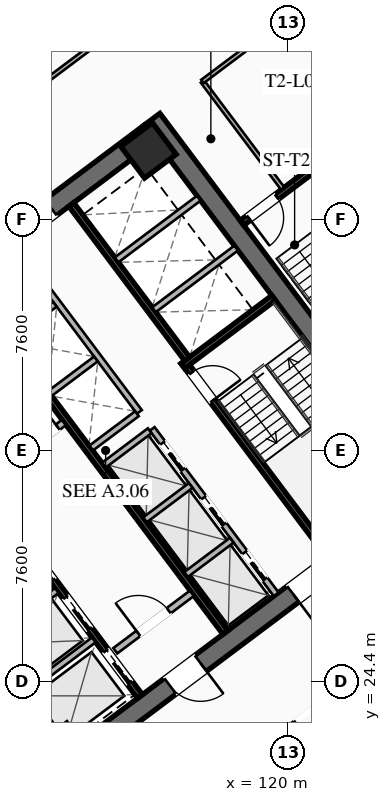
"""IFC4 building model, lengths in metres.
Left out: names, types, materials, properties, quantities, classifications, styles, units other than length and angle.
Written with IfcOpenShell. Run it as: python <this file> out.ifc"""

import sys

from ifc_helpers import new_model, si_unit, direction, frame, frame_2d, origin, origin_2d, place, context, subcontext, project, spatial, rectangle, hollow_rectangle, extrude, element, fill, save


model = new_model("IFC4")
c1 = context("Model", 3, precision=1e-05, world=origin(), true_north=direction((0.0, 1.0)))
c2 = subcontext(c1, "Body", "Model", "MODEL_VIEW")
j1 = project(units=[si_unit("LENGTHUNIT", "METRE"), si_unit("PLANEANGLEUNIT", "RADIAN")], contexts=[c1])
p1 = place(None, origin())
s1 = spatial("IfcSite", under=j1, at=p1, CompositionType="ELEMENT")
p2 = place(p1, origin())
s2 = spatial("IfcBuilding", under=s1, at=p2, CompositionType="ELEMENT")
p3 = place(p2, frame((0.0, 0.0, 31.7)))
s3 = spatial("IfcBuildingStorey", under=s2, at=p3, CompositionType="ELEMENT", Elevation=31.7)
for number, where, z_axis, x_axis in (
    (1, (112.476, 21.107, 0.0), (0.0, 0.0, 1.0), (-0.6, 0.8, 0.0)),
    (2, (115.524, 42.893, 0.0), (0.0, 0.0, 1.0), (0.6, -0.8, 0.0)),
):
    element("IfcWall", number, at=place(p3, frame(where, z_axis=z_axis, x_axis=x_axis)), inside=s3, PredefinedType="SHEAR", context=c2, shape_type="SweptSolid", body=[
        extrude(rectangle(XDim=15.6, YDim=0.65, at=frame_2d((7.8, 0.0))), origin(), (0.0, 0.0, 1.0), 3.55),
    ])
p4 = place(p3, frame((124.429, 30.478, 0.0), z_axis=(0.0, 0.0, 1.0), x_axis=(-0.799998028465, -0.600002628705, 0.0)))
e3 = element("IfcWall", 3, at=p4, inside=s3, PredefinedType="SHEAR", context=c2, shape_type="SweptSolid", body=[
    extrude(rectangle(XDim=14.86, YDim=0.65, at=frame_2d((7.43, 0.0))), origin(), (0.0, 0.0, 1.0), 3.55),
])
p5 = place(p4, frame((9.13, 0.0, 0.0)))
e4 = element("IfcOpeningElement", 4, at=p5, cuts=e3, PredefinedType="OPENING", context=c2, shape_type="SweptSolid", body=[
    extrude(rectangle(XDim=1.25, YDim=2.25, at=frame_2d((0.625, 1.125))), frame((0.0, 0.335, 0.0), z_axis=(0.0, -1.0, 0.0), x_axis=(1.0, 0.0, 0.0)), (0.0, 0.0, 1.0), 0.67),
])
p6 = place(p4, frame((4.08, 0.0, 0.0)))
e5 = element("IfcOpeningElement", 5, at=p6, cuts=e3, PredefinedType="OPENING", context=c2, shape_type="SweptSolid", body=[
    extrude(rectangle(XDim=1.25, YDim=2.25, at=frame_2d((0.625, 1.125))), frame((0.0, 0.335, 0.0), z_axis=(0.0, -1.0, 0.0), x_axis=(1.0, 0.0, 0.0)), (0.0, 0.0, 1.0), 0.67),
])
p7 = place(p3, frame((103.571, 33.522, 0.0), z_axis=(0.0, 0.0, 1.0), x_axis=(0.799998028465, 0.600002628705, 0.0)))
e6 = element("IfcWall", 6, at=p7, inside=s3, PredefinedType="SHEAR", context=c2, shape_type="SweptSolid", body=[
    extrude(rectangle(XDim=14.86, YDim=0.65, at=frame_2d((7.43, 0.0))), origin(), (0.0, 0.0, 1.0), 3.55),
])
p8 = place(p7, frame((4.48, 0.0, 0.0)))
e7 = element("IfcOpeningElement", 7, at=p8, cuts=e6, PredefinedType="OPENING", context=c2, shape_type="SweptSolid", body=[
    extrude(rectangle(XDim=1.25, YDim=2.25, at=frame_2d((0.625, 1.125))), frame((0.0, 0.335, 0.0), z_axis=(0.0, -1.0, 0.0), x_axis=(1.0, 0.0, 0.0)), (0.0, 0.0, 1.0), 0.67),
])
p9 = place(p7, frame((9.53, 0.0, 0.0)))
e8 = element("IfcOpeningElement", 8, at=p9, cuts=e6, PredefinedType="OPENING", context=c2, shape_type="SweptSolid", body=[
    extrude(rectangle(XDim=1.25, YDim=2.25, at=frame_2d((0.625, 1.125))), frame((0.0, 0.335, 0.0), z_axis=(0.0, -1.0, 0.0), x_axis=(1.0, 0.0, 0.0)), (0.0, 0.0, 1.0), 0.67),
])
p10 = place(p3, frame((115.41, 41.87, 0.0), z_axis=(0.0, 0.0, 1.0), x_axis=(0.799999996291, 0.600000004945, 0.0)))
e9 = element("IfcColumn", 9, at=p10, inside=s3, PredefinedType="COLUMN", context=c2, shape_type="SweptSolid", body=[
    extrude(hollow_rectangle(XDim=1.3, YDim=1.3, WallThickness=0.05, at=origin_2d()), origin(), (0.0, 0.0, 1.0), 3.35),
])
p11 = place(p3, frame((116.56, 34.92, 0.0), z_axis=(0.0, 0.0, 1.0), x_axis=(0.600009827119, -0.799992629566, 0.0)))
e10 = element("IfcWall", 10, at=p11, inside=s3, PredefinedType="SHEAR", context=c2, shape_type="SweptSolid", body=[
    extrude(rectangle(XDim=7.95, YDim=0.2, at=frame_2d((3.975, 0.0))), origin(), (0.0, 0.0, 1.0), 3.35),
])
p12 = place(p11, frame((0.45, 0.0, 0.0)))
e11 = element("IfcOpeningElement", 11, at=p12, cuts=e10, PredefinedType="OPENING", context=c2, shape_type="SweptSolid", body=[
    extrude(rectangle(XDim=1.15, YDim=2.2, at=frame_2d((0.575, 1.1))), frame((0.0, 0.11, 0.0), z_axis=(0.0, -1.0, 0.0), x_axis=(1.0, 0.0, 0.0)), (0.0, 0.0, 1.0), 0.22),
])
p13 = place(p3, frame((116.54, 34.78, 0.0), z_axis=(0.0, 0.0, 1.0), x_axis=(0.799984290658, 0.600020945218, 0.0)))
e12 = element("IfcWall", 12, at=p13, inside=s3, PredefinedType="SHEAR", context=c2, shape_type="SweptSolid", body=[
    extrude(rectangle(XDim=3.73, YDim=0.2, at=frame_2d((1.865, 0.0))), origin(), (0.0, 0.0, 1.0), 3.35),
])
p14 = place(p3, frame((117.938, 26.016, 0.0), z_axis=(0.0, 0.0, 1.0), x_axis=(-0.600005463273, 0.799995902516, 0.0)))
e13 = element("IfcWall", 13, at=p14, inside=s3, PredefinedType="SHEAR", context=c2, shape_type="SweptSolid", body=[
    extrude(rectangle(XDim=14.3, YDim=0.2, at=frame_2d((7.15, 0.0))), origin(), (0.0, 0.0, 1.0), 3.35),
])
p15 = place(p3, frame((110.104, 31.028, 0.0), z_axis=(0.0, 0.0, 1.0), x_axis=(0.800018601094, 0.59997519774, 0.0)))
e14 = element("IfcWall", 14, at=p15, inside=s3, PredefinedType="SOLIDWALL", context=c2, shape_type="SweptSolid", body=[
    extrude(rectangle(XDim=3.15, YDim=0.22, at=frame_2d((1.575, 0.0))), origin(), (0.0, 0.0, 1.0), 2.703),
])
p16 = place(p15, frame((0.25, 0.0, 0.0)))
e15 = element("IfcOpeningElement", 15, at=p16, cuts=e14, PredefinedType="OPENING", context=c2, shape_type="SweptSolid", body=[
    extrude(rectangle(XDim=0.95, YDim=2.05, at=frame_2d((0.475, 1.025))), frame((0.0, 0.12, 0.0), z_axis=(0.0, -1.0, 0.0), x_axis=(1.0, 0.0, 0.0)), (0.0, 0.0, 1.0), 0.24),
])
p17 = place(p15, frame((1.95, 0.0, 0.0)))
e16 = element("IfcOpeningElement", 16, at=p17, cuts=e14, PredefinedType="OPENING", context=c2, shape_type="SweptSolid", body=[
    extrude(rectangle(XDim=0.95, YDim=2.05, at=frame_2d((0.475, 1.025))), frame((0.0, 0.12, 0.0), z_axis=(0.0, -1.0, 0.0), x_axis=(1.0, 0.0, 0.0)), (0.0, 0.0, 1.0), 0.24),
])
p18 = place(p3, frame((114.316, 25.412, 0.0), z_axis=(0.0, 0.0, 1.0), x_axis=(0.800018601094, 0.59997519774, 0.0)))
e17 = element("IfcWall", 17, at=p18, inside=s3, PredefinedType="SOLIDWALL", context=c2, shape_type="SweptSolid", body=[
    extrude(rectangle(XDim=3.15, YDim=0.22, at=frame_2d((1.575, 0.0))), origin(), (0.0, 0.0, 1.0), 2.703),
])
p19 = place(p18, frame((0.95, 0.0, 0.0)))
e18 = element("IfcOpeningElement", 18, at=p19, cuts=e17, PredefinedType="OPENING", context=c2, shape_type="SweptSolid", body=[
    extrude(rectangle(XDim=1.25, YDim=2.25, at=frame_2d((0.625, 1.125))), frame((0.0, 0.12, 0.0), z_axis=(0.0, -1.0, 0.0), x_axis=(1.0, 0.0, 0.0)), (0.0, 0.0, 1.0), 0.24),
])
p20 = place(p3, frame((115.13, 23.91, 0.0), z_axis=(0.0, 0.0, 1.0), x_axis=(-0.599975393228, 0.800018454488, 0.0)))
e19 = element("IfcWall", 19, at=p20, inside=s3, PredefinedType="SHEAR", context=c2, shape_type="SweptSolid", body=[
    extrude(rectangle(XDim=6.35, YDim=0.2, at=frame_2d((3.175, 0.0))), origin(), (0.0, 0.0, 1.0), 3.35),
])
p21 = place(p20, frame((4.775, 0.0, 0.0)))
e20 = element("IfcOpeningElement", 20, at=p21, cuts=e19, PredefinedType="OPENING", context=c2, shape_type="SweptSolid", body=[
    extrude(rectangle(XDim=1.3, YDim=2.25, at=frame_2d((0.65, 1.125))), frame((0.0, 0.11, 0.0), z_axis=(0.0, -1.0, 0.0), x_axis=(1.0, 0.0, 0.0)), (0.0, 0.0, 1.0), 0.22),
])
p22 = place(p20, frame((2.775, 0.0, 0.0)))
e21 = element("IfcOpeningElement", 21, at=p22, cuts=e19, PredefinedType="OPENING", context=c2, shape_type="SweptSolid", body=[
    extrude(rectangle(XDim=1.3, YDim=2.25, at=frame_2d((0.65, 1.125))), frame((0.0, 0.11, 0.0), z_axis=(0.0, -1.0, 0.0), x_axis=(1.0, 0.0, 0.0)), (0.0, 0.0, 1.0), 0.22),
])
p23 = place(p20, frame((0.575, 0.0, 0.0)))
e22 = element("IfcOpeningElement", 22, at=p23, cuts=e19, PredefinedType="OPENING", context=c2, shape_type="SweptSolid", body=[
    extrude(rectangle(XDim=1.3, YDim=2.25, at=frame_2d((0.65, 1.125))), frame((0.0, 0.11, 0.0), z_axis=(0.0, -1.0, 0.0), x_axis=(1.0, 0.0, 0.0)), (0.0, 0.0, 1.0), 0.22),
])
for number, where, z_axis, x_axis in (
    (23, (110.906, 23.742, 0.0), (0.0, 0.0, 1.0), (0.8, 0.6, 0.0)),
    (24, (109.688, 25.366, 0.0), (0.0, 0.0, 1.0), (0.8, 0.6, 0.0)),
):
    element("IfcWall", number, at=place(p3, frame(where, z_axis=z_axis, x_axis=x_axis)), inside=s3, PredefinedType="SOLIDWALL", context=c2, shape_type="SweptSolid", body=[
        extrude(rectangle(XDim=3.38, YDim=0.2, at=frame_2d((1.69, 0.0))), origin(), (0.0, 0.0, 1.0), 3.35),
    ])
p24 = place(p3, frame((112.87, 40.09, 0.0), z_axis=(0.0, 0.0, 1.0), x_axis=(0.599975393228, -0.800018454488, 0.0)))
e25 = element("IfcWall", 25, at=p24, inside=s3, PredefinedType="SHEAR", context=c2, shape_type="SweptSolid", body=[
    extrude(rectangle(XDim=6.35, YDim=0.2, at=frame_2d((3.175, 0.0))), origin(), (0.0, 0.0, 1.0), 3.35),
])
for number, where, z_axis, x_axis in (
    (26, (115.59, 36.63, 0.0), (0.0, 0.0, 1.0), (0.8, 0.6, 0.0)),
    (27, (114.36, 38.27, 0.0), (0.0, 0.0, 1.0), (0.8, 0.6, 0.0)),
):
    element("IfcWall", number, at=place(p3, frame(where, z_axis=z_axis, x_axis=x_axis)), inside=s3, PredefinedType="SOLIDWALL", context=c2, shape_type="SweptSolid", body=[
        extrude(rectangle(XDim=3.38, YDim=0.2, at=frame_2d((1.69, 0.0))), origin(), (0.0, 0.0, 1.0), 3.35),
    ])
p25 = place(p3, frame((119.61, 27.27, 0.0), z_axis=(0.0, 0.0, 1.0), x_axis=(-0.600011488909, 0.79999138319, 0.0)))
e28 = element("IfcWall", 28, at=p25, inside=s3, PredefinedType="SOLIDWALL", context=c2, shape_type="SweptSolid", body=[
    extrude(rectangle(XDim=6.8, YDim=0.2, at=frame_2d((3.4, 0.0))), origin(), (0.0, 0.0, 1.0), 3.35),
])
p26 = place(p25, frame((0.625, 0.0, 0.0)))
e29 = element("IfcOpeningElement", 29, at=p26, cuts=e28, PredefinedType="OPENING", context=c2, shape_type="SweptSolid", body=[
    extrude(rectangle(XDim=1.1, YDim=2.2, at=frame_2d((0.55, 1.1))), frame((0.0, 0.11, 0.0), z_axis=(0.0, -1.0, 0.0), x_axis=(1.0, 0.0, 0.0)), (0.0, 0.0, 1.0), 0.22),
])
p27 = place(p25, frame((2.875, 0.0, 0.0)))
e30 = element("IfcOpeningElement", 30, at=p27, cuts=e28, PredefinedType="OPENING", context=c2, shape_type="SweptSolid", body=[
    extrude(rectangle(XDim=1.1, YDim=2.2, at=frame_2d((0.55, 1.1))), frame((0.0, 0.11, 0.0), z_axis=(0.0, -1.0, 0.0), x_axis=(1.0, 0.0, 0.0)), (0.0, 0.0, 1.0), 0.22),
])
p28 = place(p25, frame((5.125, 0.0, 0.0)))
e31 = element("IfcOpeningElement", 31, at=p28, cuts=e28, PredefinedType="OPENING", context=c2, shape_type="SweptSolid", body=[
    extrude(rectangle(XDim=1.1, YDim=2.2, at=frame_2d((0.55, 1.1))), frame((0.0, 0.11, 0.0), z_axis=(0.0, -1.0, 0.0), x_axis=(1.0, 0.0, 0.0)), (0.0, 0.0, 1.0), 0.22),
])
p29 = place(p3, frame((116.646, 27.922, 0.0), z_axis=(0.0, 0.0, 1.0), x_axis=(0.8, 0.6, 0.0)))
e32 = element("IfcWall", 32, at=p29, inside=s3, PredefinedType="SOLIDWALL", context=c2, shape_type="SweptSolid", body=[
    extrude(rectangle(XDim=1.88, YDim=0.2, at=frame_2d((0.94, 0.0))), origin(), (0.0, 0.0, 1.0), 3.35),
])
p30 = place(p3, frame((115.296, 29.722, 0.0), z_axis=(0.0, 0.0, 1.0), x_axis=(0.799984418148, 0.600020775241, 0.0)))
e33 = element("IfcWall", 33, at=p30, inside=s3, PredefinedType="SOLIDWALL", context=c2, shape_type="SweptSolid", body=[
    extrude(rectangle(XDim=1.88, YDim=0.2, at=frame_2d((0.94, 0.0))), origin(), (0.0, 0.0, 1.0), 3.35),
])
p31 = place(p3, frame((113.946, 31.522, 0.0), z_axis=(0.0, 0.0, 1.0), x_axis=(0.8, 0.6, 0.0)))
e34 = element("IfcWall", 34, at=p31, inside=s3, PredefinedType="SOLIDWALL", context=c2, shape_type="SweptSolid", body=[
    extrude(rectangle(XDim=1.88, YDim=0.2, at=frame_2d((0.94, 0.0))), origin(), (0.0, 0.0, 1.0), 3.35),
])
p32 = place(p3, frame((115.11, 33.27, 0.0), z_axis=(0.0, 0.0, 1.0), x_axis=(-0.600011488909, 0.79999138319, 0.0)))
e35 = element("IfcWall", 35, at=p32, inside=s3, PredefinedType="SOLIDWALL", context=c2, shape_type="SweptSolid", body=[
    extrude(rectangle(XDim=6.8, YDim=0.2, at=frame_2d((3.4, 0.0))), origin(), (0.0, 0.0, 1.0), 3.35),
])
p33 = place(p3, frame((113.526, 32.082, 0.0), z_axis=(0.0, 0.0, 1.0), x_axis=(0.800046745961, 0.599937666993, 0.0)))
e36 = element("IfcWall", 36, at=p33, inside=s3, PredefinedType="SOLIDWALL", context=c2, shape_type="SweptSolid", body=[
    extrude(rectangle(XDim=1.88, YDim=0.2, at=frame_2d((0.94, 0.0))), origin(), (0.0, 0.0, 1.0), 3.35),
])
p34 = place(p3, frame((112.176, 33.882, 0.0), z_axis=(0.0, 0.0, 1.0), x_axis=(0.8, 0.6, 0.0)))
e37 = element("IfcWall", 37, at=p34, inside=s3, PredefinedType="SOLIDWALL", context=c2, shape_type="SweptSolid", body=[
    extrude(rectangle(XDim=1.88, YDim=0.2, at=frame_2d((0.94, 0.0))), origin(), (0.0, 0.0, 1.0), 3.35),
])
p35 = place(p3, frame((110.826, 35.682, 0.0), z_axis=(0.0, 0.0, 1.0), x_axis=(0.799984418148, 0.600020775241, 0.0)))
e38 = element("IfcWall", 38, at=p35, inside=s3, PredefinedType="SOLIDWALL", context=c2, shape_type="SweptSolid", body=[
    extrude(rectangle(XDim=1.88, YDim=0.2, at=frame_2d((0.94, 0.0))), origin(), (0.0, 0.0, 1.0), 3.35),
])
p36 = place(p3, frame((121.204, 41.528, 0.0), z_axis=(0.0, 0.0, 1.0), x_axis=(-0.800017232136, -0.599977023131, 0.0)))
e39 = element("IfcWall", 39, at=p36, inside=s3, PredefinedType="SHEAR", context=c2, shape_type="SweptSolid", body=[
    extrude(rectangle(XDim=3.4, YDim=0.2, at=frame_2d((1.7, 0.0))), origin(), (0.0, 0.0, 1.0), 3.35),
])
p37 = place(p36, frame((1.975, 0.0, 0.0)))
e40 = element("IfcOpeningElement", 40, at=p37, cuts=e39, PredefinedType="OPENING", context=c2, shape_type="SweptSolid", body=[
    extrude(rectangle(XDim=1.15, YDim=2.2, at=frame_2d((0.575, 1.1))), frame((0.0, 0.11, 0.0), z_axis=(0.0, -1.0, 0.0), x_axis=(1.0, 0.0, 0.0)), (0.0, 0.0, 1.0), 0.22),
])
p38 = place(p3, frame((119.824, 40.618, 0.0), z_axis=(0.0, 0.0, 1.0), x_axis=(-0.599982243973, 0.800013316712, 0.0)))
e41 = element("IfcWall", 41, at=p38, inside=s3, PredefinedType="PARTITIONING", context=c2, shape_type="SweptSolid", body=[
    extrude(rectangle(XDim=4.4, YDim=0.135, at=frame_2d((2.2, 0.0))), origin(), (0.0, 0.0, 1.0), 2.703),
])
p39 = place(p3, frame((98.516, 34.012, 0.0), z_axis=(0.0, 0.0, 1.0), x_axis=(0.799998035726, 0.600002619023, 0.0)))
e42 = element("IfcWall", 42, at=p39, inside=s3, PredefinedType="PARTITIONING", context=c2, shape_type="SweptSolid", body=[
    extrude(rectangle(XDim=29.83, YDim=0.135, at=frame_2d((14.915, 0.0))), origin(), (0.0, 0.0, 1.0), 2.703),
])
p40 = place(p39, frame((0.3, 0.0, 0.0)))
e43 = element("IfcOpeningElement", 43, at=p40, cuts=e42, PredefinedType="OPENING", context=c2, shape_type="SweptSolid", body=[
    extrude(rectangle(XDim=0.95, YDim=2.05, at=frame_2d((0.475, 1.025))), frame((0.0, 0.077, 0.0), z_axis=(0.0, -1.0, 0.0), x_axis=(1.0, 0.0, 0.0)), (0.0, 0.0, 1.0), 0.155),
])
p41 = place(p39, frame((10.829, 0.0, 0.0)))
e44 = element("IfcOpeningElement", 44, at=p41, cuts=e42, PredefinedType="OPENING", context=c2, shape_type="SweptSolid", body=[
    extrude(rectangle(XDim=0.95, YDim=2.05, at=frame_2d((0.475, 1.025))), frame((0.0, 0.077, 0.0), z_axis=(0.0, -1.0, 0.0), x_axis=(1.0, 0.0, 0.0)), (0.0, 0.0, 1.0), 0.155),
])
p42 = place(p39, frame((28.58, 0.0, 0.0)))
e45 = element("IfcOpeningElement", 45, at=p42, cuts=e42, PredefinedType="OPENING", context=c2, shape_type="SweptSolid", body=[
    extrude(rectangle(XDim=0.95, YDim=2.05, at=frame_2d((0.475, 1.025))), frame((0.0, 0.077, 0.0), z_axis=(0.0, -1.0, 0.0), x_axis=(1.0, 0.0, 0.0)), (0.0, 0.0, 1.0), 0.155),
])
p43 = place(p3, frame((135.46, 34.47, 0.0), z_axis=(0.0, 0.0, 1.0), x_axis=(-0.800000982127, -0.599998690494, 0.0)))
e46 = element("IfcWall", 46, at=p43, inside=s3, PredefinedType="PARTITIONING", context=c2, shape_type="SweptSolid", body=[
    extrude(rectangle(XDim=29.83, YDim=0.135, at=frame_2d((14.915, 0.0))), origin(), (0.0, 0.0, 1.0), 2.703),
])
p44 = place(p43, frame((28.5, 0.0, 0.0)))
e47 = element("IfcOpeningElement", 47, at=p44, cuts=e46, PredefinedType="OPENING", context=c2, shape_type="SweptSolid", body=[
    extrude(rectangle(XDim=0.95, YDim=2.05, at=frame_2d((0.475, 1.025))), frame((0.0, 0.077, 0.0), z_axis=(0.0, -1.0, 0.0), x_axis=(1.0, 0.0, 0.0)), (0.0, 0.0, 1.0), 0.155),
])
p45 = place(p43, frame((18.075, 0.0, 0.0)))
e48 = element("IfcOpeningElement", 48, at=p45, cuts=e46, PredefinedType="OPENING", context=c2, shape_type="SweptSolid", body=[
    extrude(rectangle(XDim=0.95, YDim=2.05, at=frame_2d((0.475, 1.025))), frame((0.0, 0.077, 0.0), z_axis=(0.0, -1.0, 0.0), x_axis=(1.0, 0.0, 0.0)), (0.0, 0.0, 1.0), 0.155),
])
p46 = place(p43, frame((0.38, 0.0, 0.0)))
e49 = element("IfcOpeningElement", 49, at=p46, cuts=e46, PredefinedType="OPENING", context=c2, shape_type="SweptSolid", body=[
    extrude(rectangle(XDim=0.95, YDim=2.05, at=frame_2d((0.475, 1.025))), frame((0.0, 0.077, 0.0), z_axis=(0.0, -1.0, 0.0), x_axis=(1.0, 0.0, 0.0)), (0.0, 0.0, 1.0), 0.155),
])
p47 = place(p3, frame((126.664, 51.248, 0.0), z_axis=(0.0, 0.0, 1.0), x_axis=(-0.799995055373, -0.600006592779, 0.0)))
e50 = element("IfcWall", 50, at=p47, inside=s3, PredefinedType="PARTITIONING", context=c2, shape_type="SweptSolid", body=[
    extrude(rectangle(XDim=11.85, YDim=0.135, at=frame_2d((5.925, 0.0))), origin(), (0.0, 0.0, 1.0), 2.703),
])
p48 = place(p47, frame((5.8, 0.0, 0.0)))
e51 = element("IfcOpeningElement", 51, at=p48, cuts=e50, PredefinedType="OPENING", context=c2, shape_type="SweptSolid", body=[
    extrude(rectangle(XDim=0.95, YDim=2.05, at=frame_2d((0.475, 1.025))), frame((0.0, 0.077, 0.0), z_axis=(0.0, -1.0, 0.0), x_axis=(1.0, 0.0, 0.0)), (0.0, 0.0, 1.0), 0.155),
])
p49 = place(p5, origin())
e52 = element("IfcDoor", 52, at=p49, inside=s3, OperationType="SINGLE_SWING_LEFT", PredefinedType="DOOR", context=c2, shape_type="SweptSolid", body=[
    extrude(rectangle(XDim=1.25, YDim=2.25, at=frame_2d((0.625, 1.125))), frame((0.0, 0.025, 0.0), z_axis=(0.0, -1.0, 0.0), x_axis=(1.0, 0.0, 0.0)), (0.0, 0.0, 1.0), 0.05),
])
fill(e4, e52)
p50 = place(p6, origin())
e53 = element("IfcDoor", 53, at=p50, inside=s3, OperationType="SINGLE_SWING_RIGHT", PredefinedType="DOOR", context=c2, shape_type="SweptSolid", body=[
    extrude(rectangle(XDim=1.25, YDim=2.25, at=frame_2d((0.625, 1.125))), frame((0.0, 0.025, 0.0), z_axis=(0.0, -1.0, 0.0), x_axis=(1.0, 0.0, 0.0)), (0.0, 0.0, 1.0), 0.05),
])
fill(e5, e53)
p51 = place(p12, origin())
e54 = element("IfcDoor", 54, at=p51, inside=s3, OperationType="SINGLE_SWING_RIGHT", PredefinedType="DOOR", context=c2, shape_type="SweptSolid", body=[
    extrude(rectangle(XDim=1.15, YDim=2.2, at=frame_2d((0.575, 1.1))), frame((0.0, 0.025, 0.0), z_axis=(0.0, -1.0, 0.0), x_axis=(1.0, 0.0, 0.0)), (0.0, 0.0, 1.0), 0.05),
])
fill(e11, e54)
p52 = place(p19, origin())
e55 = element("IfcDoor", 55, at=p52, inside=s3, OperationType="SINGLE_SWING_LEFT", PredefinedType="DOOR", context=c2, shape_type="SweptSolid", body=[
    extrude(rectangle(XDim=1.25, YDim=2.25, at=frame_2d((0.625, 1.125))), frame((0.0, 0.025, 0.0), z_axis=(0.0, -1.0, 0.0), x_axis=(1.0, 0.0, 0.0)), (0.0, 0.0, 1.0), 0.05),
])
fill(e18, e55)
p53 = place(p17, origin())
e56 = element("IfcDoor", 56, at=p53, inside=s3, OperationType="SINGLE_SWING_RIGHT", PredefinedType="DOOR", context=c2, shape_type="SweptSolid", body=[
    extrude(rectangle(XDim=0.95, YDim=2.05, at=frame_2d((0.475, 1.025))), frame((0.0, 0.025, 0.0), z_axis=(0.0, -1.0, 0.0), x_axis=(1.0, 0.0, 0.0)), (0.0, 0.0, 1.0), 0.05),
])
fill(e16, e56)
p54 = place(p37, origin())
e57 = element("IfcDoor", 57, at=p54, inside=s3, OperationType="SINGLE_SWING_RIGHT", PredefinedType="DOOR", context=c2, shape_type="SweptSolid", body=[
    extrude(rectangle(XDim=1.15, YDim=2.2, at=frame_2d((0.575, 1.1))), frame((0.0, 0.025, 0.0), z_axis=(0.0, -1.0, 0.0), x_axis=(1.0, 0.0, 0.0)), (0.0, 0.0, 1.0), 0.05),
])
fill(e40, e57)
p55 = place(p45, origin())
e58 = element("IfcDoor", 58, at=p55, inside=s3, OperationType="SINGLE_SWING_LEFT", PredefinedType="DOOR", context=c2, shape_type="SweptSolid", body=[
    extrude(rectangle(XDim=0.95, YDim=2.05, at=frame_2d((0.475, 1.025))), frame((0.0, 0.025, 0.0), z_axis=(0.0, -1.0, 0.0), x_axis=(1.0, 0.0, 0.0)), (0.0, 0.0, 1.0), 0.05),
])
fill(e48, e58)
p56 = place(p21, origin())
e59 = element("IfcDoor", 59, at=p56, inside=s3, OperationType="SLIDING_TO_LEFT", PredefinedType="DOOR", context=c2, shape_type="SweptSolid", body=[
    extrude(rectangle(XDim=1.3, YDim=2.25, at=frame_2d((0.65, 1.125))), frame((0.0, 0.025, 0.0), z_axis=(0.0, -1.0, 0.0), x_axis=(1.0, 0.0, 0.0)), (0.0, 0.0, 1.0), 0.05),
])
fill(e20, e59)
p57 = place(p22, origin())
e60 = element("IfcDoor", 60, at=p57, inside=s3, OperationType="SLIDING_TO_LEFT", PredefinedType="DOOR", context=c2, shape_type="SweptSolid", body=[
    extrude(rectangle(XDim=1.3, YDim=2.25, at=frame_2d((0.65, 1.125))), frame((0.0, 0.025, 0.0), z_axis=(0.0, -1.0, 0.0), x_axis=(1.0, 0.0, 0.0)), (0.0, 0.0, 1.0), 0.05),
])
fill(e21, e60)
p58 = place(p23, origin())
e61 = element("IfcDoor", 61, at=p58, inside=s3, OperationType="SLIDING_TO_LEFT", PredefinedType="DOOR", context=c2, shape_type="SweptSolid", body=[
    extrude(rectangle(XDim=1.3, YDim=2.25, at=frame_2d((0.65, 1.125))), frame((0.0, 0.025, 0.0), z_axis=(0.0, -1.0, 0.0), x_axis=(1.0, 0.0, 0.0)), (0.0, 0.0, 1.0), 0.05),
])
fill(e22, e61)
p59 = place(p26, origin())
e62 = element("IfcDoor", 62, at=p59, inside=s3, OperationType="SLIDING_TO_LEFT", PredefinedType="DOOR", context=c2, shape_type="SweptSolid", body=[
    extrude(rectangle(XDim=1.1, YDim=2.2, at=frame_2d((0.55, 1.1))), frame((0.0, 0.025, 0.0), z_axis=(0.0, -1.0, 0.0), x_axis=(1.0, 0.0, 0.0)), (0.0, 0.0, 1.0), 0.05),
])
fill(e29, e62)
p60 = place(p27, origin())
e63 = element("IfcDoor", 63, at=p60, inside=s3, OperationType="SLIDING_TO_LEFT", PredefinedType="DOOR", context=c2, shape_type="SweptSolid", body=[
    extrude(rectangle(XDim=1.1, YDim=2.2, at=frame_2d((0.55, 1.1))), frame((0.0, 0.025, 0.0), z_axis=(0.0, -1.0, 0.0), x_axis=(1.0, 0.0, 0.0)), (0.0, 0.0, 1.0), 0.05),
])
fill(e30, e63)
p61 = place(p28, origin())
e64 = element("IfcDoor", 64, at=p61, inside=s3, OperationType="SLIDING_TO_LEFT", PredefinedType="DOOR", context=c2, shape_type="SweptSolid", body=[
    extrude(rectangle(XDim=1.1, YDim=2.2, at=frame_2d((0.55, 1.1))), frame((0.0, 0.025, 0.0), z_axis=(0.0, -1.0, 0.0), x_axis=(1.0, 0.0, 0.0)), (0.0, 0.0, 1.0), 0.05),
])
fill(e31, e64)
save(model, sys.argv[1])
